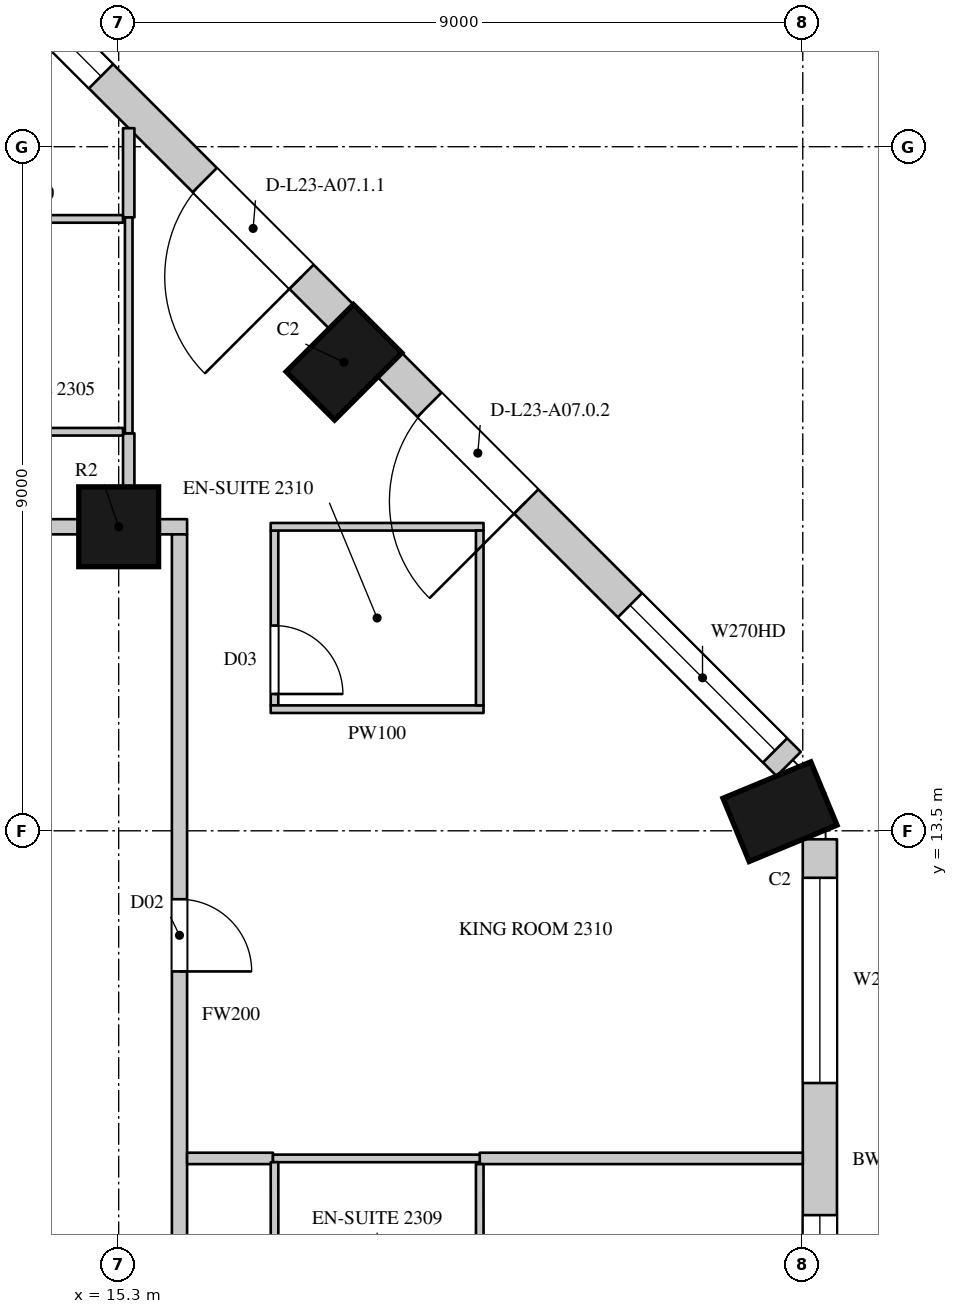
"""IFC4 building model, lengths in metres.
Left out: names, types, materials, properties, quantities, classifications, styles, units other than length and angle.
Written with IfcOpenShell. Run it as: python <this file> out.ifc"""

import sys

from ifc_helpers import new_model, si_unit, direction, frame, frame_2d, origin, origin_2d, place, context, subcontext, project, spatial, rectangle, circle, extrude, element, fill, save


model = new_model("IFC4")
c1 = context("Model", 3, precision=1e-05, world=origin(), true_north=direction((0.0, 1.0)))
c2 = subcontext(c1, "Body", "Model", "MODEL_VIEW")
j1 = project(units=[si_unit("LENGTHUNIT", "METRE"), si_unit("PLANEANGLEUNIT", "RADIAN")], contexts=[c1])
p1 = place(None, origin())
s1 = spatial("IfcSite", under=j1, at=p1, CompositionType="ELEMENT")
p2 = place(p1, origin())
s2 = spatial("IfcBuilding", under=s1, at=p2, CompositionType="ELEMENT")
p3 = place(p2, frame((0.0, 0.0, 113.1)))
s3 = spatial("IfcBuildingStorey", under=s2, at=p3, CompositionType="ELEMENT", Elevation=113.1)
for number, where, z_axis, x_axis in (
    (1, (24.0, 13.752, 0.0), (0.0, 0.0, 1.0), (-0.383, 0.924, 0.0)),
    (2, (18.264, 19.664, 0.0), (0.0, 0.0, 1.0), (-0.707, 0.707, 0.0)),
):
    element("IfcColumn", number, at=place(p3, frame(where, z_axis=z_axis, x_axis=x_axis)), inside=s3, PredefinedType="COLUMN", context=c2, shape_type="SweptSolid", body=[
        extrude(rectangle(XDim=0.9, YDim=1.25, at=origin_2d()), origin(), (0.0, 0.0, 1.0), 3.6),
    ])
p4 = place(p3, frame((15.3, 17.5, 0.0), z_axis=(0.0, 0.0, 1.0), x_axis=(1.0, 0.0, 0.0)))
e3 = element("IfcColumn", 3, at=p4, inside=s3, PredefinedType="COLUMN", context=c2, shape_type="SweptSolid", body=[
    extrude(circle(Radius=0.525, at=origin_2d()), origin(), (0.0, 0.0, 1.0), 3.6),
])
p5 = place(p3, frame((24.525, 4.95, 0.0), z_axis=(0.0, 0.0, 1.0), x_axis=(0.0, 1.0, 0.0)))
e4 = element("IfcWall", 4, at=p5, inside=s3, PredefinedType="SOLIDWALL", context=c2, shape_type="SweptSolid", body=[
    extrude(rectangle(XDim=8.439, YDim=0.45, at=frame_2d((4.219, 0.0))), origin(), (0.0, 0.0, 1.0), 3.3),
])
p6 = place(p5, frame((0.294, 0.0, 0.0)))
e5 = element("IfcOpeningElement", 5, at=p6, cuts=e4, PredefinedType="OPENING", context=c2, shape_type="SweptSolid", body=[
    extrude(rectangle(XDim=1.8, YDim=2.4, at=frame_2d((0.9, 1.2))), frame((0.0, 0.235, 0.0), z_axis=(0.0, -1.0, 0.0), x_axis=(1.0, 0.0, 0.0)), (0.0, 0.0, 1.0), 0.47),
])
p7 = place(p5, frame((2.294, 0.0, 1.05)))
e6 = element("IfcOpeningElement", 6, at=p7, cuts=e4, PredefinedType="OPENING", context=c2, shape_type="SweptSolid", body=[
    extrude(rectangle(XDim=1.2, YDim=2.0, at=frame_2d((0.6, 1.0))), frame((0.0, 0.235, 0.0), z_axis=(0.0, -1.0, 0.0), x_axis=(1.0, 0.0, 0.0)), (0.0, 0.0, 1.0), 0.47),
])
p8 = place(p5, frame((5.232, 0.0, 1.05)))
e7 = element("IfcOpeningElement", 7, at=p8, cuts=e4, PredefinedType="OPENING", context=c2, shape_type="SweptSolid", body=[
    extrude(rectangle(XDim=2.7, YDim=2.0, at=frame_2d((1.35, 1.0))), frame((0.0, 0.235, 0.0), z_axis=(0.0, -1.0, 0.0), x_axis=(1.0, 0.0, 0.0)), (0.0, 0.0, 1.0), 0.47),
])
p9 = place(p3, frame((24.115, 14.379, 0.0), z_axis=(0.0, 0.0, 1.0), x_axis=(-0.707106781187, 0.707106781187, 0.0)))
e8 = element("IfcWall", 8, at=p9, inside=s3, PredefinedType="SOLIDWALL", context=c2, shape_type="SweptSolid", body=[
    extrude(rectangle(XDim=7.424, YDim=0.45, at=frame_2d((3.712, 0.0))), origin(), (0.0, 0.0, 1.0), 3.3),
])
p10 = place(p9, frame((0.253, 0.0, 1.05)))
e9 = element("IfcOpeningElement", 9, at=p10, cuts=e8, PredefinedType="OPENING", context=c2, shape_type="SweptSolid", body=[
    extrude(rectangle(XDim=2.7, YDim=2.0, at=frame_2d((1.35, 1.0))), frame((0.0, 0.235, 0.0), z_axis=(0.0, -1.0, 0.0), x_axis=(1.0, 0.0, 0.0)), (0.0, 0.0, 1.0), 0.47),
])
p11 = place(p9, frame((4.884, 0.0, 0.0)))
e10 = element("IfcOpeningElement", 10, at=p11, cuts=e8, PredefinedType="OPENING", context=c2, shape_type="SweptSolid", body=[
    extrude(rectangle(XDim=1.8, YDim=2.4, at=frame_2d((0.9, 1.2))), frame((0.0, 0.235, 0.0), z_axis=(0.0, -1.0, 0.0), x_axis=(1.0, 0.0, 0.0)), (0.0, 0.0, 1.0), 0.47),
])
p12 = place(p3, frame((18.229, 20.265, 0.0), z_axis=(0.0, 0.0, 1.0), x_axis=(-0.707106781187, 0.707106781187, 0.0)))
e11 = element("IfcWall", 11, at=p12, inside=s3, PredefinedType="SOLIDWALL", context=c2, shape_type="SweptSolid", body=[
    extrude(rectangle(XDim=7.424, YDim=0.45, at=frame_2d((3.712, 0.0))), origin(), (0.0, 0.0, 1.0), 3.3),
])
p13 = place(p12, frame((0.74, 0.0, 0.0)))
e12 = element("IfcOpeningElement", 12, at=p13, cuts=e11, PredefinedType="OPENING", context=c2, shape_type="SweptSolid", body=[
    extrude(rectangle(XDim=1.8, YDim=2.4, at=frame_2d((0.9, 1.2))), frame((0.0, 0.235, 0.0), z_axis=(0.0, -1.0, 0.0), x_axis=(1.0, 0.0, 0.0)), (0.0, 0.0, 1.0), 0.47),
])
p14 = place(p12, frame((4.471, 0.0, 1.05)))
e13 = element("IfcOpeningElement", 13, at=p14, cuts=e11, PredefinedType="OPENING", context=c2, shape_type="SweptSolid", body=[
    extrude(rectangle(XDim=2.7, YDim=2.0, at=frame_2d((1.35, 1.0))), frame((0.0, 0.235, 0.0), z_axis=(0.0, -1.0, 0.0), x_axis=(1.0, 0.0, 0.0)), (0.0, 0.0, 1.0), 0.47),
])
p15 = place(p3, frame((23.15, 16.864, 0.0), z_axis=(0.0, 0.0, 1.0), x_axis=(-0.707106781187, 0.707106781187, 0.0)))
e14 = element("IfcWall", 14, at=p15, inside=s3, PredefinedType="SOLIDWALL", context=c2, shape_type="SweptSolid", body=[
    extrude(rectangle(XDim=1.445, YDim=0.45, at=frame_2d((0.722, 0.0))), origin(), (0.0, 0.0, 1.0), 0.6),
])
p16 = place(p3, frame((19.937, 20.078, 0.0), z_axis=(0.0, 0.0, 1.0), x_axis=(-0.707106781187, 0.707106781187, 0.0)))
e15 = element("IfcWall", 15, at=p16, inside=s3, PredefinedType="SOLIDWALL", context=c2, shape_type="SweptSolid", body=[
    extrude(rectangle(XDim=1.781, YDim=0.45, at=frame_2d((0.89, 0.0))), origin(), (0.0, 0.0, 1.0), 0.6),
])
p17 = place(p3, frame((16.486, 23.529, 0.0), z_axis=(0.0, 0.0, 1.0), x_axis=(-0.707022305137, 0.707191247145, 0.0)))
e16 = element("IfcWall", 16, at=p17, inside=s3, PredefinedType="SOLIDWALL", context=c2, shape_type="SweptSolid", body=[
    extrude(rectangle(XDim=1.445, YDim=0.45, at=frame_2d((0.723, 0.0))), origin(), (0.0, 0.0, 1.0), 0.6),
])
p18 = place(p3, frame((6.825, 17.5, 0.0), z_axis=(0.0, 0.0, 1.0), x_axis=(1.0, 0.0, 0.0)))
e17 = element("IfcWall", 17, at=p18, inside=s3, PredefinedType="PARTITIONING", context=c2, shape_type="SweptSolid", body=[
    extrude(rectangle(XDim=7.95, YDim=0.2, at=frame_2d((3.975, 0.0))), origin(), (0.0, 0.0, 1.0), 2.75),
])
p19 = place(p18, frame((1.55, 0.0, 0.0)))
e18 = element("IfcOpeningElement", 18, at=p19, cuts=e17, PredefinedType="OPENING", context=c2, shape_type="SweptSolid", body=[
    extrude(rectangle(XDim=1.1, YDim=2.4, at=frame_2d((0.55, 1.2))), frame((0.0, 0.11, 0.0), z_axis=(0.0, -1.0, 0.0), x_axis=(1.0, 0.0, 0.0)), (0.0, 0.0, 1.0), 0.22),
])
p20 = place(p3, frame((15.825, 17.5, 0.0), z_axis=(0.0, 0.0, 1.0), x_axis=(1.0, 0.0, 0.0)))
e19 = element("IfcWall", 19, at=p20, inside=s3, PredefinedType="PARTITIONING", context=c2, shape_type="SweptSolid", body=[
    extrude(rectangle(XDim=0.375, YDim=0.2, at=frame_2d((0.188, 0.0))), origin(), (0.0, 0.0, 1.0), 3.3),
])
p21 = place(p3, frame((16.1, 4.75, 0.0), z_axis=(0.0, 0.0, 1.0), x_axis=(0.0, 1.0, 0.0)))
e20 = element("IfcWall", 20, at=p21, inside=s3, PredefinedType="PARTITIONING", context=c2, shape_type="SweptSolid", body=[
    extrude(rectangle(XDim=12.65, YDim=0.2, at=frame_2d((6.325, 0.0))), origin(), (0.0, 0.0, 1.0), 3.3),
])
p22 = place(p21, frame((0.5, 0.0, 0.0)))
e21 = element("IfcOpeningElement", 21, at=p22, cuts=e20, PredefinedType="OPENING", context=c2, shape_type="SweptSolid", body=[
    extrude(rectangle(XDim=0.95, YDim=2.2, at=frame_2d((0.475, 1.1))), frame((0.0, 0.11, 0.0), z_axis=(0.0, -1.0, 0.0), x_axis=(1.0, 0.0, 0.0)), (0.0, 0.0, 1.0), 0.22),
])
p23 = place(p21, frame((6.9, 0.0, 0.0)))
e22 = element("IfcOpeningElement", 22, at=p23, cuts=e20, PredefinedType="OPENING", context=c2, shape_type="SweptSolid", body=[
    extrude(rectangle(XDim=0.95, YDim=2.2, at=frame_2d((0.475, 1.1))), frame((0.0, 0.11, 0.0), z_axis=(0.0, -1.0, 0.0), x_axis=(1.0, 0.0, 0.0)), (0.0, 0.0, 1.0), 0.22),
])
p24 = place(p3, frame((15.432, 18.016, 0.0), z_axis=(0.0, 0.0, 1.0), x_axis=(0.0, 1.0, 0.0)))
e23 = element("IfcWall", 23, at=p24, inside=s3, PredefinedType="PARTITIONING", context=c2, shape_type="SweptSolid", body=[
    extrude(rectangle(XDim=0.714, YDim=0.15, at=frame_2d((0.357, 0.0))), origin(), (0.0, 0.0, 1.0), 3.3),
])
p25 = place(p3, frame((15.432, 21.57, 0.0), z_axis=(0.0, 0.0, 1.0), x_axis=(0.0, 1.0, 0.0)))
e24 = element("IfcWall", 24, at=p25, inside=s3, PredefinedType="PARTITIONING", context=c2, shape_type="SweptSolid", body=[
    extrude(rectangle(XDim=1.174, YDim=0.15, at=frame_2d((0.587, 0.0))), origin(), (0.0, 0.0, 1.0), 3.3),
])
p26 = place(p3, frame((16.2, 9.19, 0.0), z_axis=(0.0, 0.0, 1.0), x_axis=(1.0, 0.0, 0.0)))
e25 = element("IfcWall", 25, at=p26, inside=s3, PredefinedType="PARTITIONING", context=c2, shape_type="SweptSolid", body=[
    extrude(rectangle(XDim=1.13, YDim=0.15, at=frame_2d((0.565, 0.0))), origin(), (0.0, 0.0, 1.0), 2.65),
])
p27 = place(p3, frame((20.05, 9.19, 0.0), z_axis=(0.0, 0.0, 1.0), x_axis=(1.0, 0.0, 0.0)))
e26 = element("IfcWall", 26, at=p27, inside=s3, PredefinedType="PARTITIONING", context=c2, shape_type="SweptSolid", body=[
    extrude(rectangle(XDim=4.25, YDim=0.15, at=frame_2d((2.125, 0.0))), origin(), (0.0, 0.0, 1.0), 2.65),
])
for number, where, z_axis, x_axis in (
    (27, (12.786, 18.75, 0.0), (0.0, 0.0, 1.0), (1.0, 0.0, 0.0)),
    (28, (12.786, 21.55, 0.0), (0.0, 0.0, 1.0), (1.0, 0.0, 0.0)),
):
    element("IfcWall", number, at=place(p3, frame(where, z_axis=z_axis, x_axis=x_axis)), inside=s3, PredefinedType="PARTITIONING", context=c2, shape_type="SweptSolid", body=[
        extrude(rectangle(XDim=2.571, YDim=0.1, at=frame_2d((1.286, 0.0))), origin(), (0.0, 0.0, 1.0), 3.3),
    ])
p28 = place(p3, frame((15.432, 18.73, 0.0), z_axis=(0.0, 0.0, 1.0), x_axis=(0.0, 1.0, 0.0)))
e29 = element("IfcWall", 29, at=p28, inside=s3, PredefinedType="PARTITIONING", context=c2, shape_type="SweptSolid", body=[
    extrude(rectangle(XDim=2.84, YDim=0.1, at=frame_2d((1.42, 0.0))), origin(), (0.0, 0.0, 1.0), 3.3),
])
p29 = place(p3, frame((17.33, 9.19, 0.0), z_axis=(0.0, 0.0, 1.0), x_axis=(1.0, 0.0, 0.0)))
e30 = element("IfcWall", 30, at=p29, inside=s3, PredefinedType="PARTITIONING", context=c2, shape_type="SweptSolid", body=[
    extrude(rectangle(XDim=2.72, YDim=0.1, at=frame_2d((1.36, 0.0))), origin(), (0.0, 0.0, 1.0), 2.65),
])
p30 = place(p3, frame((17.35, 9.14, 0.0), z_axis=(0.0, 0.0, 1.0), x_axis=(0.000407580973, -0.999999916939, 0.0)))
e31 = element("IfcWall", 31, at=p30, inside=s3, PredefinedType="PARTITIONING", context=c2, shape_type="SweptSolid", body=[
    extrude(rectangle(XDim=2.396, YDim=0.1, at=frame_2d((1.198, 0.0))), origin(), (0.0, 0.0, 1.0), 3.3),
])
p31 = place(p30, frame((1.25, 0.0, 0.0)))
e32 = element("IfcOpeningElement", 32, at=p31, cuts=e31, PredefinedType="OPENING", context=c2, shape_type="SweptSolid", body=[
    extrude(rectangle(XDim=0.9, YDim=2.2, at=frame_2d((0.45, 1.1))), frame((0.0, 0.06, 0.0), z_axis=(0.0, -1.0, 0.0), x_axis=(1.0, 0.0, 0.0)), (0.0, 0.0, 1.0), 0.12),
])
p32 = place(p3, frame((17.35, 15.15, 0.0), z_axis=(0.0, 0.0, 1.0), x_axis=(0.0, 1.0, 0.0)))
e33 = element("IfcWall", 33, at=p32, inside=s3, PredefinedType="PARTITIONING", context=c2, shape_type="SweptSolid", body=[
    extrude(rectangle(XDim=2.3, YDim=0.1, at=frame_2d((1.15, 0.0))), origin(), (0.0, 0.0, 1.0), 3.3),
])
p33 = place(p32, frame((0.15, 0.0, 0.0)))
e34 = element("IfcOpeningElement", 34, at=p33, cuts=e33, PredefinedType="OPENING", context=c2, shape_type="SweptSolid", body=[
    extrude(rectangle(XDim=0.9, YDim=2.2, at=frame_2d((0.45, 1.1))), frame((0.0, 0.06, 0.0), z_axis=(0.0, -1.0, 0.0), x_axis=(1.0, 0.0, 0.0)), (0.0, 0.0, 1.0), 0.12),
])
for number, where, z_axis, x_axis in (
    (35, (17.3, 15.1, 0.0), (0.0, 0.0, 1.0), (1.0, 0.0, 0.0)),
    (36, (17.3, 17.5, 0.0), (0.0, 0.0, 1.0), (1.0, 0.0, 0.0)),
):
    element("IfcWall", number, at=place(p3, frame(where, z_axis=z_axis, x_axis=x_axis)), inside=s3, PredefinedType="PARTITIONING", context=c2, shape_type="SweptSolid", body=[
        extrude(rectangle(XDim=2.8, YDim=0.1, at=frame_2d((1.4, 0.0))), origin(), (0.0, 0.0, 1.0), 3.3),
    ])
p34 = place(p3, frame((20.05, 9.115, 0.0), z_axis=(0.0, 0.0, 1.0), x_axis=(0.000430200003, -0.999999907464, 0.0)))
e37 = element("IfcWall", 37, at=p34, inside=s3, PredefinedType="PARTITIONING", context=c2, shape_type="SweptSolid", body=[
    extrude(rectangle(XDim=2.27, YDim=0.1, at=frame_2d((1.135, 0.0))), origin(), (0.0, 0.0, 1.0), 3.3),
])
p35 = place(p3, frame((20.05, 15.15, 0.0), z_axis=(0.0, 0.0, 1.0), x_axis=(0.0, 1.0, 0.0)))
e38 = element("IfcWall", 38, at=p35, inside=s3, PredefinedType="PARTITIONING", context=c2, shape_type="SweptSolid", body=[
    extrude(rectangle(XDim=2.3, YDim=0.1, at=frame_2d((1.15, 0.0))), origin(), (0.0, 0.0, 1.0), 3.3),
])
p36 = place(p7, origin())
e39 = element("IfcWindow", 39, at=p36, inside=s3, PartitioningType="SINGLE_PANEL", PredefinedType="WINDOW", context=c2, shape_type="SweptSolid", body=[
    extrude(rectangle(XDim=1.2, YDim=2.0, at=frame_2d((0.6, 1.0))), frame((0.0, 0.135, 0.0), z_axis=(0.0, -1.0, 0.0), x_axis=(1.0, 0.0, 0.0)), (0.0, 0.0, 1.0), 0.06),
])
fill(e6, e39)
p37 = place(p8, origin())
e40 = element("IfcWindow", 40, at=p37, inside=s3, PartitioningType="SINGLE_PANEL", PredefinedType="WINDOW", context=c2, shape_type="SweptSolid", body=[
    extrude(rectangle(XDim=2.7, YDim=2.0, at=frame_2d((1.35, 1.0))), frame((0.0, 0.135, 0.0), z_axis=(0.0, -1.0, 0.0), x_axis=(1.0, 0.0, 0.0)), (0.0, 0.0, 1.0), 0.06),
])
fill(e7, e40)
p38 = place(p10, origin())
e41 = element("IfcWindow", 41, at=p38, inside=s3, PartitioningType="SINGLE_PANEL", PredefinedType="WINDOW", context=c2, shape_type="SweptSolid", body=[
    extrude(rectangle(XDim=2.7, YDim=2.0, at=frame_2d((1.35, 1.0))), frame((0.0, 0.135, 0.0), z_axis=(0.0, -1.0, 0.0), x_axis=(1.0, 0.0, 0.0)), (0.0, 0.0, 1.0), 0.06),
])
fill(e9, e41)
p39 = place(p11, origin())
e42 = element("IfcDoor", 42, at=p39, inside=s3, OperationType="SLIDING_TO_LEFT", PredefinedType="DOOR", context=c2, shape_type="SweptSolid", body=[
    extrude(rectangle(XDim=1.8, YDim=2.4, at=frame_2d((0.9, 1.2))), frame((0.0, 0.13, 0.0), z_axis=(0.0, -1.0, 0.0), x_axis=(1.0, 0.0, 0.0)), (0.0, 0.0, 1.0), 0.05),
])
fill(e10, e42)
p40 = place(p13, origin())
e43 = element("IfcDoor", 43, at=p40, inside=s3, OperationType="SLIDING_TO_LEFT", PredefinedType="DOOR", context=c2, shape_type="SweptSolid", body=[
    extrude(rectangle(XDim=1.8, YDim=2.4, at=frame_2d((0.9, 1.2))), frame((0.0, 0.13, 0.0), z_axis=(0.0, -1.0, 0.0), x_axis=(1.0, 0.0, 0.0)), (0.0, 0.0, 1.0), 0.05),
])
fill(e12, e43)
p41 = place(p14, origin())
e44 = element("IfcWindow", 44, at=p41, inside=s3, PartitioningType="SINGLE_PANEL", PredefinedType="WINDOW", context=c2, shape_type="SweptSolid", body=[
    extrude(rectangle(XDim=2.7, YDim=2.0, at=frame_2d((1.35, 1.0))), frame((0.0, 0.135, 0.0), z_axis=(0.0, -1.0, 0.0), x_axis=(1.0, 0.0, 0.0)), (0.0, 0.0, 1.0), 0.06),
])
fill(e13, e44)
p42 = place(p23, origin())
e45 = element("IfcDoor", 45, at=p42, inside=s3, OperationType="SINGLE_SWING_RIGHT", PredefinedType="DOOR", context=c2, shape_type="SweptSolid", body=[
    extrude(rectangle(XDim=0.95, YDim=2.2, at=frame_2d((0.475, 1.1))), frame((0.0, 0.025, 0.0), z_axis=(0.0, -1.0, 0.0), x_axis=(1.0, 0.0, 0.0)), (0.0, 0.0, 1.0), 0.05),
])
fill(e22, e45)
p43 = place(p33, origin())
e46 = element("IfcDoor", 46, at=p43, inside=s3, OperationType="SINGLE_SWING_RIGHT", PredefinedType="DOOR", context=c2, shape_type="SweptSolid", body=[
    extrude(rectangle(XDim=0.9, YDim=2.2, at=frame_2d((0.45, 1.1))), frame((0.0, 0.025, 0.0), z_axis=(0.0, -1.0, 0.0), x_axis=(1.0, 0.0, 0.0)), (0.0, 0.0, 1.0), 0.05),
])
fill(e34, e46)
save(model, sys.argv[1])
